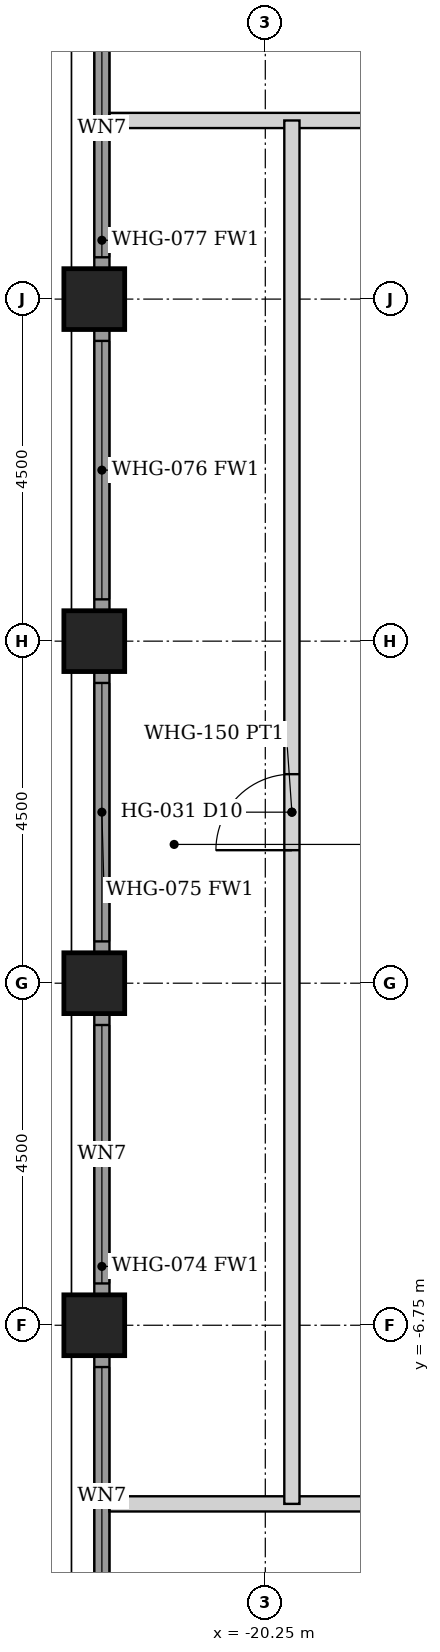
"""IFC4 building model, lengths in metres.
Left out: names, types, materials, properties, quantities, classifications, styles, units other than length and angle.
Written with IfcOpenShell. Run it as: python <this file> out.ifc"""

import sys

from ifc_helpers import new_model, si_unit, direction, frame, frame_2d, origin, origin_2d, place, context, subcontext, project, spatial, rectangle, hollow_rectangle, extrude, element, fill, save


model = new_model("IFC4")
c1 = context("Model", 3, precision=1e-05, world=origin(), true_north=direction((0.0, 1.0)))
c2 = subcontext(c1, "Body", "Model", "MODEL_VIEW")
j1 = project(units=[si_unit("LENGTHUNIT", "METRE"), si_unit("PLANEANGLEUNIT", "RADIAN")], contexts=[c1])
p1 = place(None, origin())
s1 = spatial("IfcSite", under=j1, at=p1, CompositionType="ELEMENT")
p2 = place(p1, origin())
s2 = spatial("IfcBuilding", under=s1, at=p2, CompositionType="ELEMENT")
p3 = place(p2, frame((0.0, 0.0, 186.8)))
s3 = spatial("IfcBuildingStorey", under=s2, at=p3, CompositionType="ELEMENT", Elevation=186.8)
for number, where, z_axis, x_axis in (
    (1, (-22.5, -6.75, 0.0), (0.0, 0.0, 1.0), (1.0, 0.0, 0.0)),
    (2, (-22.5, -2.25, 0.0), (0.0, 0.0, 1.0), (1.0, 0.0, 0.0)),
    (3, (-22.5, 2.25, 0.0), (0.0, 0.0, 1.0), (1.0, 0.0, 0.0)),
    (4, (-22.5, 6.75, 0.0), (0.0, 0.0, 1.0), (1.0, 0.0, 0.0)),
):
    element("IfcColumn", number, at=place(p3, frame(where, z_axis=z_axis, x_axis=x_axis)), inside=s3, PredefinedType="COLUMN", context=c2, shape_type="SweptSolid", body=[
        extrude(hollow_rectangle(XDim=0.8, YDim=0.8, WallThickness=0.045, at=origin_2d()), origin(), (0.0, 0.0, 1.0), 3.6),
    ])
p4 = place(p3, frame((-22.4, -10.845, 0.0), z_axis=(0.0, 0.0, 1.0), x_axis=(0.0, 1.0, 0.0)))
e5 = element("IfcWall", 5, at=p4, inside=s3, PredefinedType="SOLIDWALL", context=c2, shape_type="SweptSolid", body=[
    extrude(rectangle(XDim=3.69, YDim=0.2, at=frame_2d((1.845, 0.0))), origin(), (0.0, 0.0, 1.0), 2.379),
])
p5 = place(p4, frame((0.145, 0.0, 0.3)))
e6 = element("IfcOpeningElement", 6, at=p5, cuts=e5, PredefinedType="OPENING", context=c2, shape_type="SweptSolid", body=[
    extrude(rectangle(XDim=3.4, YDim=1.929, at=frame_2d((1.7, 0.964))), frame((0.0, 0.11, 0.0), z_axis=(0.0, -1.0, 0.0), x_axis=(1.0, 0.0, 0.0)), (0.0, 0.0, 1.0), 0.22),
])
p6 = place(p3, frame((-22.4, -6.345, 0.0), z_axis=(0.0, 0.0, 1.0), x_axis=(0.0, 1.0, 0.0)))
e7 = element("IfcWall", 7, at=p6, inside=s3, PredefinedType="SOLIDWALL", context=c2, shape_type="SweptSolid", body=[
    extrude(rectangle(XDim=3.69, YDim=0.2, at=frame_2d((1.845, 0.0))), origin(), (0.0, 0.0, 1.0), 2.379),
])
p7 = place(p6, frame((0.145, 0.0, 0.3)))
e8 = element("IfcOpeningElement", 8, at=p7, cuts=e7, PredefinedType="OPENING", context=c2, shape_type="SweptSolid", body=[
    extrude(rectangle(XDim=3.4, YDim=1.929, at=frame_2d((1.7, 0.964))), frame((0.0, 0.11, 0.0), z_axis=(0.0, -1.0, 0.0), x_axis=(1.0, 0.0, 0.0)), (0.0, 0.0, 1.0), 0.22),
])
p8 = place(p3, frame((-22.4, -1.845, 0.0), z_axis=(0.0, 0.0, 1.0), x_axis=(0.0, 1.0, 0.0)))
e9 = element("IfcWall", 9, at=p8, inside=s3, PredefinedType="SOLIDWALL", context=c2, shape_type="SweptSolid", body=[
    extrude(rectangle(XDim=3.69, YDim=0.2, at=frame_2d((1.845, 0.0))), origin(), (0.0, 0.0, 1.0), 2.379),
])
p9 = place(p8, frame((0.145, 0.0, 0.3)))
e10 = element("IfcOpeningElement", 10, at=p9, cuts=e9, PredefinedType="OPENING", context=c2, shape_type="SweptSolid", body=[
    extrude(rectangle(XDim=3.4, YDim=1.929, at=frame_2d((1.7, 0.964))), frame((0.0, 0.11, 0.0), z_axis=(0.0, -1.0, 0.0), x_axis=(1.0, 0.0, 0.0)), (0.0, 0.0, 1.0), 0.22),
])
p10 = place(p3, frame((-22.4, 2.655, 0.0), z_axis=(0.0, 0.0, 1.0), x_axis=(0.0, 1.0, 0.0)))
e11 = element("IfcWall", 11, at=p10, inside=s3, PredefinedType="SOLIDWALL", context=c2, shape_type="SweptSolid", body=[
    extrude(rectangle(XDim=3.69, YDim=0.2, at=frame_2d((1.845, 0.0))), origin(), (0.0, 0.0, 1.0), 2.379),
])
p11 = place(p10, frame((0.145, 0.0, 0.3)))
e12 = element("IfcOpeningElement", 12, at=p11, cuts=e11, PredefinedType="OPENING", context=c2, shape_type="SweptSolid", body=[
    extrude(rectangle(XDim=3.4, YDim=1.929, at=frame_2d((1.7, 0.964))), frame((0.0, 0.11, 0.0), z_axis=(0.0, -1.0, 0.0), x_axis=(1.0, 0.0, 0.0)), (0.0, 0.0, 1.0), 0.22),
])
p12 = place(p3, frame((-22.4, 7.155, 0.0), z_axis=(0.0, 0.0, 1.0), x_axis=(0.0, 1.0, 0.0)))
e13 = element("IfcWall", 13, at=p12, inside=s3, PredefinedType="SOLIDWALL", context=c2, shape_type="SweptSolid", body=[
    extrude(rectangle(XDim=3.69, YDim=0.2, at=frame_2d((1.845, 0.0))), origin(), (0.0, 0.0, 1.0), 2.379),
])
p13 = place(p12, frame((0.145, 0.0, 0.3)))
e14 = element("IfcOpeningElement", 14, at=p13, cuts=e13, PredefinedType="OPENING", context=c2, shape_type="SweptSolid", body=[
    extrude(rectangle(XDim=3.4, YDim=1.929, at=frame_2d((1.7, 0.964))), frame((0.0, 0.11, 0.0), z_axis=(0.0, -1.0, 0.0), x_axis=(1.0, 0.0, 0.0)), (0.0, 0.0, 1.0), 0.22),
])
p14 = place(p3, frame((-22.3, 9.1, 0.0), z_axis=(0.0, 0.0, 1.0), x_axis=(1.0, 0.0, 0.0)))
e15 = element("IfcWall", 15, at=p14, inside=s3, PredefinedType="PARTITIONING", context=c2, shape_type="SweptSolid", body=[
    extrude(rectangle(XDim=44.6, YDim=0.2, at=frame_2d((22.3, 0.0))), origin(), (0.0, 0.0, 1.0), 2.379),
])
p15 = place(p14, frame((11.35, 0.0, 0.0)))
e16 = element("IfcOpeningElement", 16, at=p15, cuts=e15, PredefinedType="OPENING", context=c2, shape_type="SweptSolid", body=[
    extrude(rectangle(XDim=0.9, YDim=2.1, at=frame_2d((0.45, 1.05))), frame((0.0, 0.11, 0.0), z_axis=(0.0, -1.0, 0.0), x_axis=(1.0, 0.0, 0.0)), (0.0, 0.0, 1.0), 0.22),
])
p16 = place(p14, frame((15.75, 0.0, 0.0)))
e17 = element("IfcOpeningElement", 17, at=p16, cuts=e15, PredefinedType="OPENING", context=c2, shape_type="SweptSolid", body=[
    extrude(rectangle(XDim=0.9, YDim=2.1, at=frame_2d((0.45, 1.05))), frame((0.0, 0.11, 0.0), z_axis=(0.0, -1.0, 0.0), x_axis=(1.0, 0.0, 0.0)), (0.0, 0.0, 1.0), 0.22),
])
p17 = place(p14, frame((23.45, 0.0, 0.0)))
e18 = element("IfcOpeningElement", 18, at=p17, cuts=e15, PredefinedType="OPENING", context=c2, shape_type="SweptSolid", body=[
    extrude(rectangle(XDim=0.9, YDim=2.1, at=frame_2d((0.45, 1.05))), frame((0.0, 0.11, 0.0), z_axis=(0.0, -1.0, 0.0), x_axis=(1.0, 0.0, 0.0)), (0.0, 0.0, 1.0), 0.22),
])
p18 = place(p14, frame((24.75, 0.0, 0.0)))
e19 = element("IfcOpeningElement", 19, at=p18, cuts=e15, PredefinedType="OPENING", context=c2, shape_type="SweptSolid", body=[
    extrude(rectangle(XDim=0.9, YDim=2.1, at=frame_2d((0.45, 1.05))), frame((0.0, 0.11, 0.0), z_axis=(0.0, -1.0, 0.0), x_axis=(1.0, 0.0, 0.0)), (0.0, 0.0, 1.0), 0.22),
])
p19 = place(p14, frame((29.35, 0.0, 0.0)))
e20 = element("IfcOpeningElement", 20, at=p19, cuts=e15, PredefinedType="OPENING", context=c2, shape_type="SweptSolid", body=[
    extrude(rectangle(XDim=0.9, YDim=2.1, at=frame_2d((0.45, 1.05))), frame((0.0, 0.11, 0.0), z_axis=(0.0, -1.0, 0.0), x_axis=(1.0, 0.0, 0.0)), (0.0, 0.0, 1.0), 0.22),
])
p20 = place(p14, frame((38.85, 0.0, 0.0)))
e21 = element("IfcOpeningElement", 21, at=p20, cuts=e15, PredefinedType="OPENING", context=c2, shape_type="SweptSolid", body=[
    extrude(rectangle(XDim=0.9, YDim=2.1, at=frame_2d((0.45, 1.05))), frame((0.0, 0.11, 0.0), z_axis=(0.0, -1.0, 0.0), x_axis=(1.0, 0.0, 0.0)), (0.0, 0.0, 1.0), 0.22),
])
p21 = place(p14, frame((4.85, 0.0, 0.0)))
e22 = element("IfcOpeningElement", 22, at=p21, cuts=e15, PredefinedType="OPENING", context=c2, shape_type="SweptSolid", body=[
    extrude(rectangle(XDim=0.9, YDim=2.1, at=frame_2d((0.45, 1.05))), frame((0.0, 0.11, 0.0), z_axis=(0.0, -1.0, 0.0), x_axis=(1.0, 0.0, 0.0)), (0.0, 0.0, 1.0), 0.22),
])
p22 = place(p3, frame((-22.3, -9.1, 0.0), z_axis=(0.0, 0.0, 1.0), x_axis=(1.0, 0.0, 0.0)))
e23 = element("IfcWall", 23, at=p22, inside=s3, PredefinedType="PARTITIONING", context=c2, shape_type="SweptSolid", body=[
    extrude(rectangle(XDim=44.6, YDim=0.2, at=frame_2d((22.3, 0.0))), origin(), (0.0, 0.0, 1.0), 2.379),
])
p23 = place(p22, frame((11.35, 0.0, 0.0)))
e24 = element("IfcOpeningElement", 24, at=p23, cuts=e23, PredefinedType="OPENING", context=c2, shape_type="SweptSolid", body=[
    extrude(rectangle(XDim=0.9, YDim=2.1, at=frame_2d((0.45, 1.05))), frame((0.0, 0.11, 0.0), z_axis=(0.0, -1.0, 0.0), x_axis=(1.0, 0.0, 0.0)), (0.0, 0.0, 1.0), 0.22),
])
p24 = place(p22, frame((15.75, 0.0, 0.0)))
e25 = element("IfcOpeningElement", 25, at=p24, cuts=e23, PredefinedType="OPENING", context=c2, shape_type="SweptSolid", body=[
    extrude(rectangle(XDim=0.9, YDim=2.1, at=frame_2d((0.45, 1.05))), frame((0.0, 0.11, 0.0), z_axis=(0.0, -1.0, 0.0), x_axis=(1.0, 0.0, 0.0)), (0.0, 0.0, 1.0), 0.22),
])
p25 = place(p22, frame((23.45, 0.0, 0.0)))
e26 = element("IfcOpeningElement", 26, at=p25, cuts=e23, PredefinedType="OPENING", context=c2, shape_type="SweptSolid", body=[
    extrude(rectangle(XDim=0.9, YDim=2.1, at=frame_2d((0.45, 1.05))), frame((0.0, 0.11, 0.0), z_axis=(0.0, -1.0, 0.0), x_axis=(1.0, 0.0, 0.0)), (0.0, 0.0, 1.0), 0.22),
])
p26 = place(p22, frame((24.75, 0.0, 0.0)))
e27 = element("IfcOpeningElement", 27, at=p26, cuts=e23, PredefinedType="OPENING", context=c2, shape_type="SweptSolid", body=[
    extrude(rectangle(XDim=0.9, YDim=2.1, at=frame_2d((0.45, 1.05))), frame((0.0, 0.11, 0.0), z_axis=(0.0, -1.0, 0.0), x_axis=(1.0, 0.0, 0.0)), (0.0, 0.0, 1.0), 0.22),
])
p27 = place(p22, frame((29.25, 0.0, 0.0)))
e28 = element("IfcOpeningElement", 28, at=p27, cuts=e23, PredefinedType="OPENING", context=c2, shape_type="SweptSolid", body=[
    extrude(rectangle(XDim=0.9, YDim=2.1, at=frame_2d((0.45, 1.05))), frame((0.0, 0.11, 0.0), z_axis=(0.0, -1.0, 0.0), x_axis=(1.0, 0.0, 0.0)), (0.0, 0.0, 1.0), 0.22),
])
p28 = place(p22, frame((38.85, 0.0, 0.0)))
e29 = element("IfcOpeningElement", 29, at=p28, cuts=e23, PredefinedType="OPENING", context=c2, shape_type="SweptSolid", body=[
    extrude(rectangle(XDim=0.9, YDim=2.1, at=frame_2d((0.45, 1.05))), frame((0.0, 0.11, 0.0), z_axis=(0.0, -1.0, 0.0), x_axis=(1.0, 0.0, 0.0)), (0.0, 0.0, 1.0), 0.22),
])
p29 = place(p22, frame((4.85, 0.0, 0.0)))
e30 = element("IfcOpeningElement", 30, at=p29, cuts=e23, PredefinedType="OPENING", context=c2, shape_type="SweptSolid", body=[
    extrude(rectangle(XDim=0.9, YDim=2.1, at=frame_2d((0.45, 1.05))), frame((0.0, 0.11, 0.0), z_axis=(0.0, -1.0, 0.0), x_axis=(1.0, 0.0, 0.0)), (0.0, 0.0, 1.0), 0.22),
])
p30 = place(p3, frame((-19.9, -9.1, 0.0), z_axis=(0.0, 0.0, 1.0), x_axis=(0.0, 1.0, 0.0)))
e31 = element("IfcWall", 31, at=p30, inside=s3, PredefinedType="PARTITIONING", context=c2, shape_type="SweptSolid", body=[
    extrude(rectangle(XDim=18.2, YDim=0.2, at=frame_2d((9.1, 0.0))), origin(), (0.0, 0.0, 1.0), 2.379),
])
p31 = place(p30, frame((8.6, 0.0, 0.0)))
e32 = element("IfcOpeningElement", 32, at=p31, cuts=e31, PredefinedType="OPENING", context=c2, shape_type="SweptSolid", body=[
    extrude(rectangle(XDim=1.0, YDim=2.1, at=frame_2d((0.5, 1.05))), frame((0.0, 0.11, 0.0), z_axis=(0.0, -1.0, 0.0), x_axis=(1.0, 0.0, 0.0)), (0.0, 0.0, 1.0), 0.22),
])
p32 = place(p5, origin())
e33 = element("IfcWindow", 33, at=p32, inside=s3, PartitioningType="SINGLE_PANEL", PredefinedType="WINDOW", context=c2, shape_type="SweptSolid", body=[
    extrude(rectangle(XDim=3.4, YDim=1.929, at=frame_2d((1.7, 0.964))), frame((0.0, 0.03, 0.0), z_axis=(0.0, -1.0, 0.0), x_axis=(1.0, 0.0, 0.0)), (0.0, 0.0, 1.0), 0.06),
])
fill(e6, e33)
p33 = place(p7, origin())
e34 = element("IfcWindow", 34, at=p33, inside=s3, PartitioningType="SINGLE_PANEL", PredefinedType="WINDOW", context=c2, shape_type="SweptSolid", body=[
    extrude(rectangle(XDim=3.4, YDim=1.929, at=frame_2d((1.7, 0.964))), frame((0.0, 0.03, 0.0), z_axis=(0.0, -1.0, 0.0), x_axis=(1.0, 0.0, 0.0)), (0.0, 0.0, 1.0), 0.06),
])
fill(e8, e34)
p34 = place(p9, origin())
e35 = element("IfcWindow", 35, at=p34, inside=s3, PartitioningType="SINGLE_PANEL", PredefinedType="WINDOW", context=c2, shape_type="SweptSolid", body=[
    extrude(rectangle(XDim=3.4, YDim=1.929, at=frame_2d((1.7, 0.964))), frame((0.0, 0.03, 0.0), z_axis=(0.0, -1.0, 0.0), x_axis=(1.0, 0.0, 0.0)), (0.0, 0.0, 1.0), 0.06),
])
fill(e10, e35)
p35 = place(p11, origin())
e36 = element("IfcWindow", 36, at=p35, inside=s3, PartitioningType="SINGLE_PANEL", PredefinedType="WINDOW", context=c2, shape_type="SweptSolid", body=[
    extrude(rectangle(XDim=3.4, YDim=1.929, at=frame_2d((1.7, 0.964))), frame((0.0, 0.03, 0.0), z_axis=(0.0, -1.0, 0.0), x_axis=(1.0, 0.0, 0.0)), (0.0, 0.0, 1.0), 0.06),
])
fill(e12, e36)
p36 = place(p13, origin())
e37 = element("IfcWindow", 37, at=p36, inside=s3, PartitioningType="SINGLE_PANEL", PredefinedType="WINDOW", context=c2, shape_type="SweptSolid", body=[
    extrude(rectangle(XDim=3.4, YDim=1.929, at=frame_2d((1.7, 0.964))), frame((0.0, 0.03, 0.0), z_axis=(0.0, -1.0, 0.0), x_axis=(1.0, 0.0, 0.0)), (0.0, 0.0, 1.0), 0.06),
])
fill(e14, e37)
p37 = place(p31, origin())
e38 = element("IfcDoor", 38, at=p37, inside=s3, OperationType="SINGLE_SWING_LEFT", PredefinedType="DOOR", context=c2, shape_type="SweptSolid", body=[
    extrude(rectangle(XDim=1.0, YDim=2.1, at=frame_2d((0.5, 1.05))), frame((0.0, 0.025, 0.0), z_axis=(0.0, -1.0, 0.0), x_axis=(1.0, 0.0, 0.0)), (0.0, 0.0, 1.0), 0.05),
])
fill(e32, e38)
save(model, sys.argv[1])
